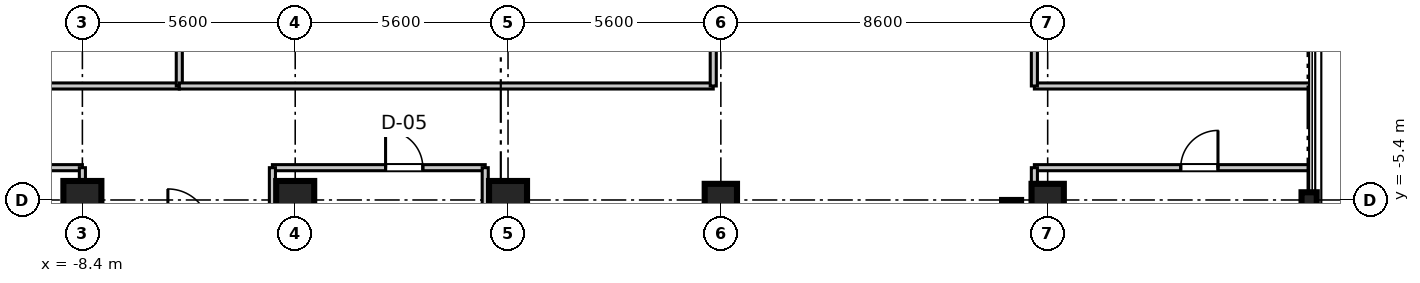
"""IFC4 building model, lengths in metres.
Left out: names, types, materials, properties, quantities, classifications, styles, units other than length and angle.
Written with IfcOpenShell. Run it as: python <this file> out.ifc"""

import sys

from ifc_helpers import new_model, si_unit, direction, frame, frame_2d, origin, origin_2d, place, context, subcontext, project, spatial, rectangle, i_section, extrude, source, transform, mapped, element, fill, save


model = new_model("IFC4")
c1 = context("Model", 3, precision=1e-05, world=origin(), true_north=direction((0.0, 1.0)))
c2 = subcontext(c1, "Body", "Model", "MODEL_VIEW")
j1 = project(units=[si_unit("LENGTHUNIT", "METRE"), si_unit("PLANEANGLEUNIT", "RADIAN")], contexts=[c1])
p1 = place(None, origin())
s1 = spatial("IfcSite", under=j1, at=p1, CompositionType="ELEMENT")
p2 = place(p1, origin())
s2 = spatial("IfcBuilding", under=s1, at=p2, CompositionType="ELEMENT")
p3 = place(p2, frame((0.0, 0.0, 256.7)))
s3 = spatial("IfcBuildingStorey", under=s2, at=p3, CompositionType="ELEMENT", Elevation=256.7)
m1 = source(origin(), c2, "Body", "SweptSolid", [
    extrude(rectangle(XDim=1.0, YDim=1.0, at=origin_2d()), origin(), (0.0, 0.0, 1.0), 4.755),
])
for number, where, z_axis, x_axis in (
    (1, (-8.4, -5.4, 0.0), (0.0, 0.0, 1.0), (1.0, 0.0, 0.0)),
    (2, (-2.8, -5.4, 0.0), (0.0, 0.0, 1.0), (1.0, 0.0, 0.0)),
    (3, (2.8, -5.4, 0.0), (0.0, 0.0, 1.0), (1.0, 0.0, 0.0)),
):
    element("IfcColumn", number, at=place(p3, frame(where, z_axis=z_axis, x_axis=x_axis)), inside=s3, PredefinedType="COLUMN", context=c2, shape_type="MappedRepresentation", body=[
        mapped(m1, transform((0.0, 0.0, 0.0), scale=1.0)),
    ])
m2 = source(origin(), c2, "Body", "SweptSolid", [
    extrude(rectangle(XDim=0.85, YDim=0.85, at=origin_2d()), origin(), (0.0, 0.0, 1.0), 4.755),
])
for number, where, z_axis, x_axis in (
    (4, (8.4, -5.4, 0.0), (0.0, 0.0, 1.0), (1.0, 0.0, 0.0)),
    (5, (17.0, -5.4, 0.0), (0.0, 0.0, 1.0), (1.0, 0.0, 0.0)),
):
    element("IfcColumn", number, at=place(p3, frame(where, z_axis=z_axis, x_axis=x_axis)), inside=s3, PredefinedType="PILASTER", context=c2, shape_type="MappedRepresentation", body=[
        mapped(m2, transform((0.0, 0.0, 0.0), scale=1.0)),
    ])
m3 = source(origin(), c2, "Body", "SweptSolid", [
    extrude(i_section(OverallWidth=0.401, OverallDepth=0.406, WebThickness=0.016, FlangeThickness=0.025, at=origin_2d()), origin(), (0.0, 0.0, 1.0), 4.707),
])
p4 = place(p3, frame((23.88, -5.4, 0.0), z_axis=(-0.148692963872, 0.0, 0.988883411983), x_axis=(0.0, -1.0, 0.0)))
e6 = element("IfcColumn", 6, at=p4, inside=s3, PredefinedType="COLUMN", context=c2, shape_type="MappedRepresentation", body=[
    mapped(m3, transform((0.0, 0.0, 0.0), scale=1.0)),
])
m4 = source(origin(), c2, "Body", "SweptSolid", [
    extrude(rectangle(XDim=11.6, YDim=0.5, at=frame_2d((5.8, 0.0))), origin(), (0.0, 0.0, 1.0), 4.44),
])
p5 = place(p3, frame((16.05, -17.0, 0.0), z_axis=(0.0, 0.0, 1.0), x_axis=(0.0, 1.0, 0.0)))
e7 = element("IfcWall", 7, at=p5, inside=s3, PredefinedType="SHEAR", context=c2, shape_type="MappedRepresentation", body=[
    mapped(m4, transform((0.0, 0.0, 0.0), scale=1.0)),
])
m5 = source(origin(), c2, "Body", "SweptSolid", [
    extrude(rectangle(XDim=18.05, YDim=0.16, at=frame_2d((9.025, 0.0))), origin(), (0.0, 0.0, 1.0), 3.4),
])
p6 = place(p3, frame((-23.9, -2.4, 0.0), z_axis=(0.0, 0.0, 1.0), x_axis=(1.0, 0.0, 0.0)))
e8 = element("IfcWall", 8, at=p6, inside=s3, PredefinedType="PARTITIONING", context=c2, shape_type="MappedRepresentation", body=[
    mapped(m5, transform((0.0, 0.0, 0.0), scale=1.0)),
])
m6 = source(origin(), c2, "Body", "SweptSolid", [
    extrude(rectangle(XDim=4.8, YDim=0.16, at=frame_2d((2.4, 0.0))), origin(), (0.0, 0.0, 1.0), 3.4),
])
p7 = place(p3, frame((-5.85, -2.4, 0.0), z_axis=(0.0, 0.0, 1.0), x_axis=(0.0, 1.0, 0.0)))
e9 = element("IfcWall", 9, at=p7, inside=s3, PredefinedType="PARTITIONING", context=c2, shape_type="MappedRepresentation", body=[
    mapped(m6, transform((0.0, 0.0, 0.0), scale=1.0)),
])
m7 = source(origin(), c2, "Body", "SweptSolid", [
    extrude(rectangle(XDim=14.05, YDim=0.16, at=frame_2d((7.025, 0.0))), origin(), (0.0, 0.0, 1.0), 3.4),
])
p8 = place(p3, frame((-5.85, -2.4, 0.0), z_axis=(0.0, 0.0, 1.0), x_axis=(1.0, 0.0, 0.0)))
e10 = element("IfcWall", 10, at=p8, inside=s3, PredefinedType="PARTITIONING", context=c2, shape_type="MappedRepresentation", body=[
    mapped(m7, transform((0.0, 0.0, 0.0), scale=1.0)),
])
p9 = place(p3, frame((8.2, -2.4, 0.0), z_axis=(0.0, 0.0, 1.0), x_axis=(0.0, 1.0, 0.0)))
e11 = element("IfcWall", 11, at=p9, inside=s3, PredefinedType="PARTITIONING", context=c2, shape_type="MappedRepresentation", body=[
    mapped(m6, transform((0.0, 0.0, 0.0), scale=1.0)),
])
m8 = source(origin(), c2, "Body", "SweptSolid", [
    extrude(rectangle(XDim=7.25, YDim=0.16, at=frame_2d((3.625, 0.0))), origin(), (0.0, 0.0, 1.0), 3.4),
])
p10 = place(p3, frame((16.65, -2.4, 0.0), z_axis=(0.0, 0.0, 1.0), x_axis=(1.0, 0.0, 0.0)))
e12 = element("IfcWall", 12, at=p10, inside=s3, PredefinedType="PARTITIONING", context=c2, shape_type="MappedRepresentation", body=[
    mapped(m8, transform((0.0, 0.0, 0.0), scale=1.0)),
])
p11 = place(p3, frame((16.65, -2.4, 0.0), z_axis=(0.0, 0.0, 1.0), x_axis=(0.0, 1.0, 0.0)))
e13 = element("IfcWall", 13, at=p11, inside=s3, PredefinedType="PARTITIONING", context=c2, shape_type="MappedRepresentation", body=[
    mapped(m6, transform((0.0, 0.0, 0.0), scale=1.0)),
])
m9 = source(origin(), c2, "Body", "SweptSolid", [
    extrude(rectangle(XDim=15.5, YDim=0.16, at=frame_2d((7.75, 0.0))), origin(), (0.0, 0.0, 1.0), 3.4),
])
p12 = place(p3, frame((-23.9, -4.55, 0.0), z_axis=(0.0, 0.0, 1.0), x_axis=(1.0, 0.0, 0.0)))
e14 = element("IfcWall", 14, at=p12, inside=s3, PredefinedType="PARTITIONING", context=c2, shape_type="MappedRepresentation", body=[
    mapped(m9, transform((0.0, 0.0, 0.0), scale=1.0)),
])
m10 = source(origin(), c2, "Body", "SweptSolid", [
    extrude(rectangle(XDim=19.35, YDim=0.16, at=frame_2d((9.675, 0.0))), origin(), (0.0, 0.0, 1.0), 3.4),
])
p13 = place(p3, frame((-8.4, -23.9, 0.0), z_axis=(0.0, 0.0, 1.0), x_axis=(0.0, 1.0, 0.0)))
e15 = element("IfcWall", 15, at=p13, inside=s3, PredefinedType="PARTITIONING", context=c2, shape_type="MappedRepresentation", body=[
    mapped(m10, transform((0.0, 0.0, 0.0), scale=1.0)),
])
p14 = place(p13, frame((12.275, 0.0, 0.0)))
e16 = element("IfcOpeningElement", 16, at=p14, cuts=e15, PredefinedType="OPENING", context=c2, shape_type="SweptSolid", body=[
    extrude(rectangle(XDim=1.5, YDim=2.15, at=frame_2d((0.75, 1.075))), frame((0.0, 0.09, 0.0), z_axis=(0.0, -1.0, 0.0), x_axis=(1.0, 0.0, 0.0)), (0.0, 0.0, 1.0), 0.18),
])
p15 = place(p3, frame((16.65, -4.55, 0.0), z_axis=(0.0, 0.0, 1.0), x_axis=(1.0, 0.0, 0.0)))
e17 = element("IfcWall", 17, at=p15, inside=s3, PredefinedType="PARTITIONING", context=c2, shape_type="MappedRepresentation", body=[
    mapped(m8, transform((0.0, 0.0, 0.0), scale=1.0)),
])
p16 = place(p15, frame((3.851, 0.0, 0.0)))
e18 = element("IfcOpeningElement", 18, at=p16, cuts=e17, PredefinedType="OPENING", context=c2, shape_type="SweptSolid", body=[
    extrude(rectangle(XDim=0.98, YDim=2.1, at=frame_2d((0.49, 1.05))), frame((0.0, 0.09, 0.0), z_axis=(0.0, -1.0, 0.0), x_axis=(1.0, 0.0, 0.0)), (0.0, 0.0, 1.0), 0.18),
])
m11 = source(origin(), c2, "Body", "SweptSolid", [
    extrude(rectangle(XDim=8.45, YDim=0.16, at=frame_2d((4.225, 0.0))), origin(), (0.0, 0.0, 1.0), 3.4),
])
p17 = place(p3, frame((16.65, -13.0, 0.0), z_axis=(0.0, 0.0, 1.0), x_axis=(0.0, 1.0, 0.0)))
e19 = element("IfcWall", 19, at=p17, inside=s3, PredefinedType="PARTITIONING", context=c2, shape_type="MappedRepresentation", body=[
    mapped(m11, transform((0.0, 0.0, 0.0), scale=1.0)),
])
m12 = source(origin(), c2, "Body", "SweptSolid", [
    extrude(rectangle(XDim=5.6, YDim=0.16, at=frame_2d((2.8, 0.0))), origin(), (0.0, 0.0, 1.0), 3.4),
])
p18 = place(p3, frame((-3.4, -4.55, 0.0), z_axis=(0.0, 0.0, 1.0), x_axis=(1.0, 0.0, 0.0)))
e20 = element("IfcWall", 20, at=p18, inside=s3, PredefinedType="PARTITIONING", context=c2, shape_type="MappedRepresentation", body=[
    mapped(m12, transform((0.0, 0.0, 0.0), scale=1.0)),
])
p19 = place(p18, frame((2.978, 0.0, 0.0)))
e21 = element("IfcOpeningElement", 21, at=p19, cuts=e20, PredefinedType="OPENING", context=c2, shape_type="SweptSolid", body=[
    extrude(rectangle(XDim=0.98, YDim=2.1, at=frame_2d((0.49, 1.05))), frame((0.0, 0.09, 0.0), z_axis=(0.0, -1.0, 0.0), x_axis=(1.0, 0.0, 0.0)), (0.0, 0.0, 1.0), 0.18),
])
m13 = source(origin(), c2, "Body", "SweptSolid", [
    extrude(rectangle(XDim=5.95, YDim=0.16, at=frame_2d((2.975, 0.0))), origin(), (0.0, 0.0, 1.0), 3.4),
])
for number, where, z_axis, x_axis in (
    (22, (-3.4, -10.5, 0.0), (0.0, 0.0, 1.0), (0.0, 1.0, 0.0)),
    (23, (2.2, -10.5, 0.0), (0.0, 0.0, 1.0), (0.0, 1.0, 0.0)),
):
    element("IfcWall", number, at=place(p3, frame(where, z_axis=z_axis, x_axis=x_axis)), inside=s3, PredefinedType="PARTITIONING", context=c2, shape_type="MappedRepresentation", body=[
        mapped(m13, transform((0.0, 0.0, 0.0), scale=1.0)),
    ])
m14 = source(origin(), c2, "Body", "SweptSolid", [
    extrude(rectangle(XDim=0.98, YDim=2.1, at=frame_2d((0.49, 1.05))), frame((0.0, 0.025, 0.0), z_axis=(0.0, -1.0, 0.0), x_axis=(1.0, 0.0, 0.0)), (0.0, 0.0, 1.0), 0.05),
])
p20 = place(p16, frame((0.98, 0.0, 0.0), z_axis=(0.0, 0.0, 1.0), x_axis=(-1.0, 0.0, 0.0)))
e24 = element("IfcDoor", 24, at=p20, inside=s3, OperationType="SINGLE_SWING_RIGHT", PredefinedType="DOOR", context=c2, shape_type="MappedRepresentation", body=[
    mapped(m14, transform((0.0, 0.0, 0.0), scale=1.0)),
])
fill(e18, e24)
p21 = place(p19, frame((0.98, 0.0, 0.0), z_axis=(0.0, 0.0, 1.0), x_axis=(-1.0, 0.0, 0.0)))
e25 = element("IfcDoor", 25, at=p21, inside=s3, OperationType="SINGLE_SWING_LEFT", PredefinedType="DOOR", context=c2, shape_type="MappedRepresentation", body=[
    mapped(m14, transform((0.0, 0.0, 0.0), scale=1.0)),
])
fill(e21, e25)
save(model, sys.argv[1])
